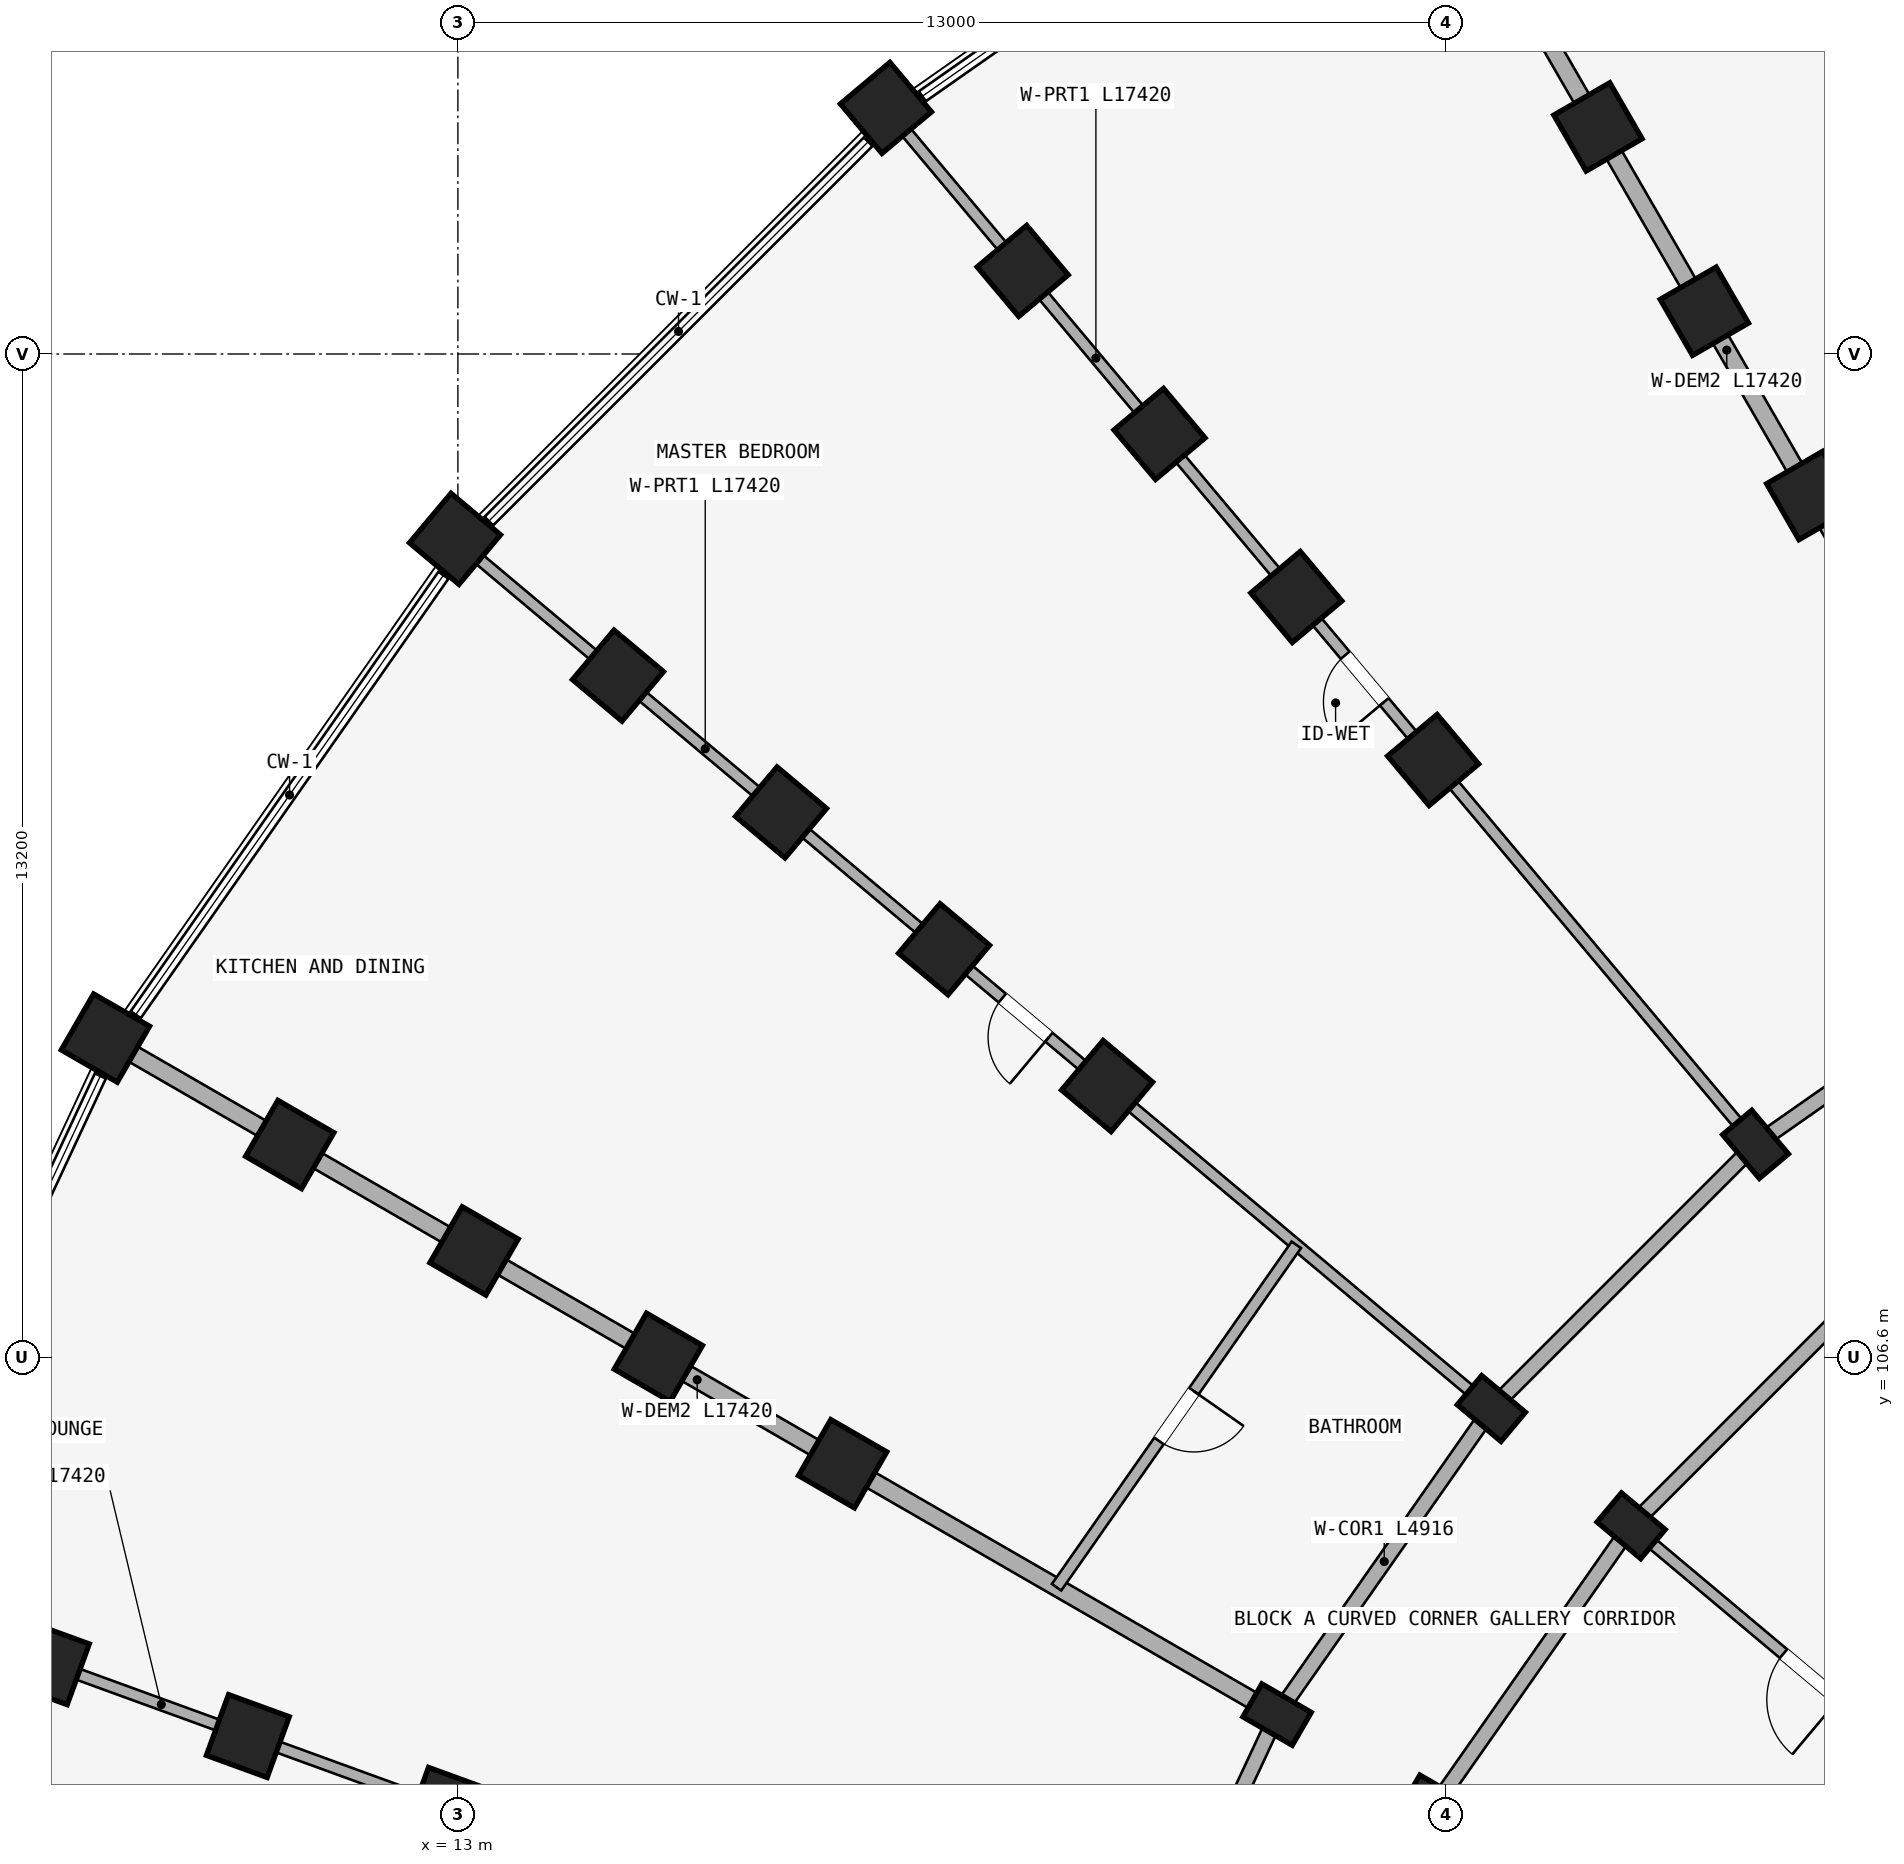
"""IFC4 building model, lengths in metres.
Left out: names, types, materials, properties, quantities, classifications, styles, units other than length and angle.
Written with IfcOpenShell. Run it as: python <this file> out.ifc"""

import sys

from ifc_helpers import new_model, si_unit, direction, frame, frame_2d, origin, origin_2d, place, context, subcontext, project, spatial, rectangle, extrude, element, fill, save


model = new_model("IFC4")
c1 = context("Model", 3, precision=1e-05, world=origin(), true_north=direction((0.0, 1.0)))
c2 = subcontext(c1, "Body", "Model", "MODEL_VIEW")
j1 = project(units=[si_unit("LENGTHUNIT", "METRE"), si_unit("PLANEANGLEUNIT", "RADIAN")], contexts=[c1])
p1 = place(None, origin())
s1 = spatial("IfcSite", under=j1, at=p1, CompositionType="ELEMENT")
p2 = place(p1, origin())
s2 = spatial("IfcBuilding", under=s1, at=p2, CompositionType="ELEMENT")
p3 = place(p2, frame((0.0, 0.0, 4.5)))
s3 = spatial("IfcBuildingStorey", under=s2, at=p3, CompositionType="ELEMENT", Elevation=4.5)
for number, where, z_axis, x_axis in (
    (1, (30.8, 117.938, 0.0), (0.0, 0.0, 1.0), (0.866, 0.5, 0.0)),
    (2, (29.4, 120.363, 0.0), (0.0, 0.0, 1.0), (0.866, 0.5, 0.0)),
    (3, (28.0, 122.787, 0.0), (0.0, 0.0, 1.0), (0.866, 0.5, 0.0)),
):
    element("IfcColumn", number, at=place(p3, frame(where, z_axis=z_axis, x_axis=x_axis)), inside=s3, PredefinedType="COLUMN", context=c2, shape_type="SweptSolid", body=[
        extrude(rectangle(XDim=0.85, YDim=0.85, at=origin_2d()), origin(), (0.0, 0.0, 1.0), 3.98),
    ])
p4 = place(p3, frame((30.073, 109.402, 0.0), z_axis=(0.0, 0.0, 1.0), x_axis=(0.766044443119, 0.642787609687, 0.0)))
e4 = element("IfcColumn", 4, at=p4, inside=s3, PredefinedType="COLUMN", context=c2, shape_type="SweptSolid", body=[
    extrude(rectangle(XDim=0.5, YDim=0.75, at=origin_2d()), origin(), (0.0, 0.0, 1.0), 3.98),
])
for number, where, z_axis, x_axis in (
    (5, (25.831, 114.458, 0.0), (0.0, 0.0, 1.0), (0.766, 0.643, 0.0)),
    (6, (24.031, 116.603, 0.0), (0.0, 0.0, 1.0), (0.766, 0.643, 0.0)),
    (7, (22.231, 118.748, 0.0), (0.0, 0.0, 1.0), (0.766, 0.643, 0.0)),
    (8, (20.432, 120.893, 0.0), (0.0, 0.0, 1.0), (0.766, 0.643, 0.0)),
    (9, (18.632, 123.038, 0.0), (0.0, 0.0, 1.0), (0.766, 0.643, 0.0)),
):
    element("IfcColumn", number, at=place(p3, frame(where, z_axis=z_axis, x_axis=x_axis)), inside=s3, PredefinedType="COLUMN", context=c2, shape_type="SweptSolid", body=[
        extrude(rectangle(XDim=0.85, YDim=0.85, at=origin_2d()), origin(), (0.0, 0.0, 1.0), 3.98),
    ])
for number, where, z_axis, x_axis in (
    (10, (28.436, 104.384, 0.0), (0.0, 0.0, 1.0), (0.643, 0.766, 0.0)),
    (11, (26.598, 105.927, 0.0), (0.0, 0.0, 1.0), (0.643, 0.766, 0.0)),
):
    element("IfcColumn", number, at=place(p3, frame(where, z_axis=z_axis, x_axis=x_axis)), inside=s3, PredefinedType="COLUMN", context=c2, shape_type="SweptSolid", body=[
        extrude(rectangle(XDim=0.5, YDim=0.75, at=origin_2d()), origin(), (0.0, 0.0, 1.0), 3.98),
    ])
for number, where, z_axis, x_axis in (
    (12, (21.542, 110.169, 0.0), (0.0, 0.0, 1.0), (0.643, 0.766, 0.0)),
    (13, (19.397, 111.969, 0.0), (0.0, 0.0, 1.0), (0.643, 0.766, 0.0)),
    (14, (17.252, 113.769, 0.0), (0.0, 0.0, 1.0), (0.643, 0.766, 0.0)),
    (15, (15.107, 115.568, 0.0), (0.0, 0.0, 1.0), (0.643, 0.766, 0.0)),
    (16, (12.962, 117.368, 0.0), (0.0, 0.0, 1.0), (0.643, 0.766, 0.0)),
):
    element("IfcColumn", number, at=place(p3, frame(where, z_axis=z_axis, x_axis=x_axis)), inside=s3, PredefinedType="COLUMN", context=c2, shape_type="SweptSolid", body=[
        extrude(rectangle(XDim=0.85, YDim=0.85, at=origin_2d()), origin(), (0.0, 0.0, 1.0), 3.98),
    ])
for number, where, z_axis, x_axis in (
    (17, (25.856, 100.7, 0.0), (0.0, 0.0, 1.0), (0.5, 0.866, 0.0)),
    (18, (23.778, 101.9, 0.0), (0.0, 0.0, 1.0), (0.5, 0.866, 0.0)),
):
    element("IfcColumn", number, at=place(p3, frame(where, z_axis=z_axis, x_axis=x_axis)), inside=s3, PredefinedType="COLUMN", context=c2, shape_type="SweptSolid", body=[
        extrude(rectangle(XDim=0.5, YDim=0.75, at=origin_2d()), origin(), (0.0, 0.0, 1.0), 3.98),
    ])
for number, where, z_axis, x_axis in (
    (19, (18.062, 105.2, 0.0), (0.0, 0.0, 1.0), (0.5, 0.866, 0.0)),
    (20, (15.637, 106.6, 0.0), (0.0, 0.0, 1.0), (0.5, 0.866, 0.0)),
    (21, (13.213, 108.0, 0.0), (0.0, 0.0, 1.0), (0.5, 0.866, 0.0)),
    (22, (10.788, 109.4, 0.0), (0.0, 0.0, 1.0), (0.5, 0.866, 0.0)),
    (23, (8.363, 110.8, 0.0), (0.0, 0.0, 1.0), (0.5, 0.866, 0.0)),
    (24, (12.868, 100.66, 0.0), (0.0, 0.0, 1.0), (0.342, 0.94, 0.0)),
    (25, (10.236, 101.618, 0.0), (0.0, 0.0, 1.0), (0.342, 0.94, 0.0)),
    (26, (7.605, 102.575, 0.0), (0.0, 0.0, 1.0), (0.342, 0.94, 0.0)),
):
    element("IfcColumn", number, at=place(p3, frame(where, z_axis=z_axis, x_axis=x_axis)), inside=s3, PredefinedType="COLUMN", context=c2, shape_type="SweptSolid", body=[
        extrude(rectangle(XDim=0.85, YDim=0.85, at=origin_2d()), origin(), (0.0, 0.0, 1.0), 3.98),
    ])
p5 = place(p3, frame((34.1, 112.222, 0.0), z_axis=(0.0, 0.0, 1.0), x_axis=(-0.819140911474, -0.573592335331, 0.0)))
e27 = element("IfcWall", 27, at=p5, inside=s3, PredefinedType="STANDARD", context=c2, shape_type="SweptSolid", body=[
    extrude(rectangle(XDim=4.916, YDim=0.2, at=frame_2d((2.458, 0.0))), origin(), (0.0, 0.0, 1.0), 3.322),
])
p6 = place(p5, frame((1.938, 0.0, 0.0)))
e28 = element("IfcOpeningElement", 28, at=p6, cuts=e27, PredefinedType="OPENING", context=c2, shape_type="SweptSolid", body=[
    extrude(rectangle(XDim=1.04, YDim=2.15, at=frame_2d((0.52, 1.075))), frame((0.0, 0.11, 0.0), z_axis=(0.0, -1.0, 0.0), x_axis=(1.0, 0.0, 0.0)), (0.0, 0.0, 1.0), 0.22),
])
p7 = place(p3, frame((31.616, 107.564, 0.0), z_axis=(0.0, 0.0, 1.0), x_axis=(-0.707106781187, -0.707106781187, 0.0)))
e29 = element("IfcWall", 29, at=p7, inside=s3, PredefinedType="STANDARD", context=c2, shape_type="SweptSolid", body=[
    extrude(rectangle(XDim=4.497, YDim=0.2, at=frame_2d((2.249, 0.0))), origin(), (0.0, 0.0, 1.0), 3.322),
])
p8 = place(p3, frame((30.073, 109.402, 0.0), z_axis=(0.0, 0.0, 1.0), x_axis=(-0.707106781187, -0.707106781187, 0.0)))
e30 = element("IfcWall", 30, at=p8, inside=s3, PredefinedType="STANDARD", context=c2, shape_type="SweptSolid", body=[
    extrude(rectangle(XDim=4.916, YDim=0.2, at=frame_2d((2.458, 0.0))), origin(), (0.0, 0.0, 1.0), 3.322),
])
p9 = place(p3, frame((28.436, 104.384, 0.0), z_axis=(0.0, 0.0, 1.0), x_axis=(-0.573571637217, -0.819155404658, 0.0)))
e31 = element("IfcWall", 31, at=p9, inside=s3, PredefinedType="STANDARD", context=c2, shape_type="SweptSolid", body=[
    extrude(rectangle(XDim=4.497, YDim=0.2, at=frame_2d((2.249, 0.0))), origin(), (0.0, 0.0, 1.0), 3.322),
])
p10 = place(p3, frame((26.598, 105.927, 0.0), z_axis=(0.0, 0.0, 1.0), x_axis=(-0.573592335331, -0.819140911474, 0.0)))
e32 = element("IfcWall", 32, at=p10, inside=s3, PredefinedType="STANDARD", context=c2, shape_type="SweptSolid", body=[
    extrude(rectangle(XDim=4.916, YDim=0.2, at=frame_2d((2.458, 0.0))), origin(), (0.0, 0.0, 1.0), 3.322),
])
p11 = place(p3, frame((23.778, 101.9, 0.0), z_axis=(0.0, 0.0, 1.0), x_axis=(-0.422629854778, -0.906302381024, 0.0)))
e33 = element("IfcWall", 33, at=p11, inside=s3, PredefinedType="STANDARD", context=c2, shape_type="SweptSolid", body=[
    extrude(rectangle(XDim=4.915, YDim=0.2, at=frame_2d((2.458, 0.0))), origin(), (0.0, 0.0, 1.0), 3.322),
])
p12 = place(p11, frame((1.918, 0.0, 0.0)))
e34 = element("IfcOpeningElement", 34, at=p12, cuts=e33, PredefinedType="OPENING", context=c2, shape_type="SweptSolid", body=[
    extrude(rectangle(XDim=1.08, YDim=2.15, at=frame_2d((0.54, 1.075))), frame((0.0, 0.11, 0.0), z_axis=(0.0, -1.0, 0.0), x_axis=(1.0, 0.0, 0.0)), (0.0, 0.0, 1.0), 0.22),
])
p13 = place(p3, frame((34.05, 112.309, 0.0), z_axis=(0.0, 0.0, 1.0), x_axis=(-0.499997843263, 0.866026648973, 0.0)))
e35 = element("IfcWall", 35, at=p13, inside=s3, PredefinedType="STANDARD", context=c2, shape_type="SweptSolid", body=[
    extrude(rectangle(XDim=17.42, YDim=0.23, at=frame_2d((8.71, 0.0))), origin(), (0.0, 0.0, 1.0), 3.322),
])
p14 = place(p3, frame((30.009, 109.479, 0.0), z_axis=(0.0, 0.0, 1.0), x_axis=(-0.642784757967, 0.766046835987, 0.0)))
e36 = element("IfcWall", 36, at=p14, inside=s3, PredefinedType="PARTITIONING", context=c2, shape_type="SweptSolid", body=[
    extrude(rectangle(XDim=17.42, YDim=0.15, at=frame_2d((8.71, 0.0))), origin(), (0.0, 0.0, 1.0), 3.322),
])
p15 = place(p14, frame((7.5, 0.0, 0.0)))
e37 = element("IfcOpeningElement", 37, at=p15, cuts=e36, PredefinedType="OPENING", context=c2, shape_type="SweptSolid", body=[
    extrude(rectangle(XDim=0.8, YDim=2.1, at=frame_2d((0.4, 1.05))), frame((0.0, 0.085, 0.0), z_axis=(0.0, -1.0, 0.0), x_axis=(1.0, 0.0, 0.0)), (0.0, 0.0, 1.0), 0.17),
])
p16 = place(p3, frame((33.645, 100.013, 0.0), z_axis=(0.0, 0.0, 1.0), x_axis=(-0.766046761698, 0.642784846501, 0.0)))
e38 = element("IfcWall", 38, at=p16, inside=s3, PredefinedType="PARTITIONING", context=c2, shape_type="SweptSolid", body=[
    extrude(rectangle(XDim=6.75, YDim=0.15, at=frame_2d((3.375, 0.0))), origin(), (0.0, 0.0, 1.0), 3.322),
])
p17 = place(p16, frame((3.242, 0.0, 0.0)))
e39 = element("IfcOpeningElement", 39, at=p17, cuts=e38, PredefinedType="OPENING", context=c2, shape_type="SweptSolid", body=[
    extrude(rectangle(XDim=0.94, YDim=2.1, at=frame_2d((0.47, 1.05))), frame((0.0, 0.085, 0.0), z_axis=(0.0, -1.0, 0.0), x_axis=(1.0, 0.0, 0.0)), (0.0, 0.0, 1.0), 0.17),
])
p18 = place(p3, frame((26.521, 105.991, 0.0), z_axis=(0.0, 0.0, 1.0), x_axis=(-0.766046835987, 0.642784757967, 0.0)))
e40 = element("IfcWall", 40, at=p18, inside=s3, PredefinedType="PARTITIONING", context=c2, shape_type="SweptSolid", body=[
    extrude(rectangle(XDim=17.42, YDim=0.15, at=frame_2d((8.71, 0.0))), origin(), (0.0, 0.0, 1.0), 3.322),
])
p19 = place(p18, frame((7.5, 0.0, 0.0)))
e41 = element("IfcOpeningElement", 41, at=p19, cuts=e40, PredefinedType="OPENING", context=c2, shape_type="SweptSolid", body=[
    extrude(rectangle(XDim=0.8, YDim=2.1, at=frame_2d((0.4, 1.05))), frame((0.0, 0.085, 0.0), z_axis=(0.0, -1.0, 0.0), x_axis=(1.0, 0.0, 0.0)), (0.0, 0.0, 1.0), 0.17),
])
p20 = place(p3, frame((23.691, 101.95, 0.0), z_axis=(0.0, 0.0, 1.0), x_axis=(-0.866026648973, 0.499997843263, 0.0)))
e42 = element("IfcWall", 42, at=p20, inside=s3, PredefinedType="STANDARD", context=c2, shape_type="SweptSolid", body=[
    extrude(rectangle(XDim=17.42, YDim=0.23, at=frame_2d((8.71, 0.0))), origin(), (0.0, 0.0, 1.0), 3.322),
])
p21 = place(p3, frame((21.607, 97.479, 0.0), z_axis=(0.0, 0.0, 1.0), x_axis=(-0.939691901159, 0.342022120477, 0.0)))
e43 = element("IfcWall", 43, at=p21, inside=s3, PredefinedType="PARTITIONING", context=c2, shape_type="SweptSolid", body=[
    extrude(rectangle(XDim=17.42, YDim=0.15, at=frame_2d((8.71, 0.0))), origin(), (0.0, 0.0, 1.0), 3.322),
])
p22 = place(p21, frame((7.5, 0.0, 0.0)))
e44 = element("IfcOpeningElement", 44, at=p22, cuts=e43, PredefinedType="OPENING", context=c2, shape_type="SweptSolid", body=[
    extrude(rectangle(XDim=0.8, YDim=2.1, at=frame_2d((0.4, 1.05))), frame((0.0, 0.085, 0.0), z_axis=(0.0, -1.0, 0.0), x_axis=(1.0, 0.0, 0.0)), (0.0, 0.0, 1.0), 0.17),
])
p23 = place(p3, frame((24.031, 108.08, 0.0), z_axis=(0.0, 0.0, 1.0), x_axis=(-0.573569599955, -0.819156831143, 0.0)))
e45 = element("IfcWall", 45, at=p23, inside=s3, PredefinedType="PLUMBINGWALL", context=c2, shape_type="SweptSolid", body=[
    extrude(rectangle(XDim=5.5, YDim=0.15, at=frame_2d((2.75, 0.0))), origin(), (0.0, 0.0, 1.0), 3.322),
])
p24 = place(p23, frame((2.35, 0.0, 0.0)))
e46 = element("IfcOpeningElement", 46, at=p24, cuts=e45, PredefinedType="OPENING", context=c2, shape_type="SweptSolid", body=[
    extrude(rectangle(XDim=0.8, YDim=2.1, at=frame_2d((0.4, 1.05))), frame((0.0, 0.085, 0.0), z_axis=(0.0, -1.0, 0.0), x_axis=(1.0, 0.0, 0.0)), (0.0, 0.0, 1.0), 0.17),
])
p25 = place(p15, frame((0.8, 0.0, 0.0), z_axis=(0.0, 0.0, 1.0), x_axis=(-1.0, 0.0, 0.0)))
e47 = element("IfcDoor", 47, at=p25, inside=s3, OperationType="SINGLE_SWING_RIGHT", PredefinedType="DOOR", context=c2, shape_type="SweptSolid", body=[
    extrude(rectangle(XDim=0.8, YDim=2.1, at=frame_2d((0.4, 1.05))), frame((0.0, 0.025, 0.0), z_axis=(0.0, -1.0, 0.0), x_axis=(1.0, 0.0, 0.0)), (0.0, 0.0, 1.0), 0.05),
])
fill(e37, e47)
p26 = place(p17, origin())
e48 = element("IfcDoor", 48, at=p26, inside=s3, OperationType="SINGLE_SWING_LEFT", PredefinedType="DOOR", context=c2, shape_type="SweptSolid", body=[
    extrude(rectangle(XDim=0.94, YDim=2.1, at=frame_2d((0.47, 1.05))), frame((0.0, 0.025, 0.0), z_axis=(0.0, -1.0, 0.0), x_axis=(1.0, 0.0, 0.0)), (0.0, 0.0, 1.0), 0.05),
])
fill(e39, e48)
p27 = place(p19, frame((0.8, 0.0, 0.0), z_axis=(0.0, 0.0, 1.0), x_axis=(-1.0, 0.0, 0.0)))
e49 = element("IfcDoor", 49, at=p27, inside=s3, OperationType="SINGLE_SWING_RIGHT", PredefinedType="DOOR", context=c2, shape_type="SweptSolid", body=[
    extrude(rectangle(XDim=0.8, YDim=2.1, at=frame_2d((0.4, 1.05))), frame((0.0, 0.025, 0.0), z_axis=(0.0, -1.0, 0.0), x_axis=(1.0, 0.0, 0.0)), (0.0, 0.0, 1.0), 0.05),
])
fill(e41, e49)
p28 = place(p24, frame((0.8, 0.0, 0.0), z_axis=(0.0, 0.0, 1.0), x_axis=(-1.0, 0.0, 0.0)))
e50 = element("IfcDoor", 50, at=p28, inside=s3, OperationType="SINGLE_SWING_RIGHT", PredefinedType="DOOR", context=c2, shape_type="SweptSolid", body=[
    extrude(rectangle(XDim=0.8, YDim=2.1, at=frame_2d((0.4, 1.05))), frame((0.0, 0.025, 0.0), z_axis=(0.0, -1.0, 0.0), x_axis=(1.0, 0.0, 0.0)), (0.0, 0.0, 1.0), 0.05),
])
fill(e46, e50)
save(model, sys.argv[1])
